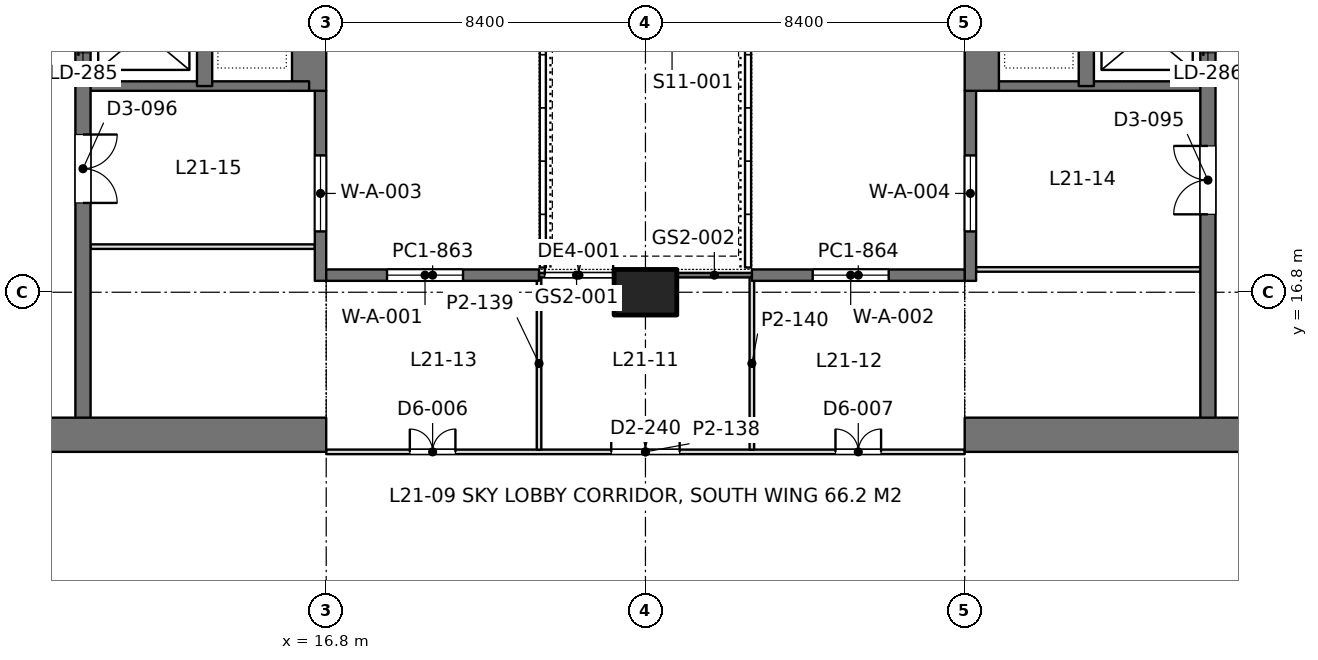
"""IFC4 building model, lengths in metres.
Left out: names, types, materials, properties, quantities, classifications, styles, units other than length and angle.
Written with IfcOpenShell. Run it as: python <this file> out.ifc"""

import sys

from ifc_helpers import new_model, si_unit, direction, frame, frame_2d, origin, origin_2d, place, context, subcontext, project, spatial, rectangle, extrude, element, fill, save


model = new_model("IFC4")
c1 = context("Model", 3, precision=1e-05, world=origin(), true_north=direction((0.0, 1.0)))
c2 = subcontext(c1, "Body", "Model", "MODEL_VIEW")
j1 = project(units=[si_unit("LENGTHUNIT", "METRE"), si_unit("PLANEANGLEUNIT", "RADIAN")], contexts=[c1])
p1 = place(None, origin())
s1 = spatial("IfcSite", under=j1, at=p1, CompositionType="ELEMENT")
p2 = place(p1, origin())
s2 = spatial("IfcBuilding", under=s1, at=p2, CompositionType="ELEMENT")
p3 = place(p2, frame((0.0, 0.0, 96.3)))
s3 = spatial("IfcBuildingStorey", under=s2, at=p3, CompositionType="ELEMENT", Elevation=96.3)
p4 = place(p3, frame((25.2, 16.8, 0.0), z_axis=(0.0, 0.0, 1.0), x_axis=(1.0, 0.0, 0.0)))
e1 = element("IfcColumn", 1, at=p4, inside=s3, PredefinedType="COLUMN", context=c2, shape_type="SweptSolid", body=[
    extrude(rectangle(XDim=1.65, YDim=1.2, at=origin_2d()), origin(), (0.0, 0.0, 1.0), 4.5),
])
p5 = place(p3, frame((-1.2, 13.05, 0.0), z_axis=(0.0, 0.0, 1.0), x_axis=(1.0, 0.0, 0.0)))
e2 = element("IfcWall", 2, at=p5, inside=s3, PredefinedType="SHEAR", context=c2, shape_type="SweptSolid", body=[
    extrude(rectangle(XDim=18.0, YDim=0.9, at=frame_2d((9.0, 0.0))), origin(), (0.0, 0.0, 1.0), 4.5),
])
p6 = place(p5, frame((8.95, 0.0, 0.0)))
e3 = element("IfcOpeningElement", 3, at=p6, cuts=e2, PredefinedType="OPENING", context=c2, shape_type="SweptSolid", body=[
    extrude(rectangle(XDim=1.8, YDim=2.4, at=frame_2d((0.9, 1.2))), frame((0.0, 0.46, 0.0), z_axis=(0.0, -1.0, 0.0), x_axis=(1.0, 0.0, 0.0)), (0.0, 0.0, 1.0), 0.92),
])
p7 = place(p3, frame((16.35, 22.1, 0.0), z_axis=(0.0, 0.0, 1.0), x_axis=(0.0, 1.0, 0.0)))
e4 = element("IfcWall", 4, at=p7, inside=s3, PredefinedType="SHEAR", context=c2, shape_type="SweptSolid", body=[
    extrude(rectangle(XDim=15.25, YDim=0.9, at=frame_2d((7.625, 0.0))), origin(), (0.0, 0.0, 1.0), 4.5),
])
p8 = place(p3, frame((10.4, 13.05, 0.0), z_axis=(0.0, 0.0, 1.0), x_axis=(0.0, 1.0, 0.0)))
e5 = element("IfcWall", 5, at=p8, inside=s3, PredefinedType="SHEAR", context=c2, shape_type="SweptSolid", body=[
    extrude(rectangle(XDim=24.3, YDim=0.4, at=frame_2d((12.15, 0.0))), origin(), (0.0, 0.0, 1.0), 4.5),
])
p9 = place(p8, frame((10.05, 0.0, 0.0)))
e6 = element("IfcOpeningElement", 6, at=p9, cuts=e5, PredefinedType="OPENING", context=c2, shape_type="SweptSolid", body=[
    extrude(rectangle(XDim=1.1, YDim=2.2, at=frame_2d((0.55, 1.1))), frame((0.0, 0.21, 0.0), z_axis=(0.0, -1.0, 0.0), x_axis=(1.0, 0.0, 0.0)), (0.0, 0.0, 1.0), 0.42),
])
p10 = place(p8, frame((12.9, 0.0, 0.0)))
e7 = element("IfcOpeningElement", 7, at=p10, cuts=e5, PredefinedType="OPENING", context=c2, shape_type="SweptSolid", body=[
    extrude(rectangle(XDim=1.1, YDim=2.2, at=frame_2d((0.55, 1.1))), frame((0.0, 0.21, 0.0), z_axis=(0.0, -1.0, 0.0), x_axis=(1.0, 0.0, 0.0)), (0.0, 0.0, 1.0), 0.42),
])
p11 = place(p8, frame((21.45, 0.0, 0.0)))
e8 = element("IfcOpeningElement", 8, at=p11, cuts=e5, PredefinedType="OPENING", context=c2, shape_type="SweptSolid", body=[
    extrude(rectangle(XDim=1.1, YDim=2.2, at=frame_2d((0.55, 1.1))), frame((0.0, 0.21, 0.0), z_axis=(0.0, -1.0, 0.0), x_axis=(1.0, 0.0, 0.0)), (0.0, 0.0, 1.0), 0.42),
])
p12 = place(p8, frame((6.1, 0.0, 0.0)))
e9 = element("IfcOpeningElement", 9, at=p12, cuts=e5, PredefinedType="OPENING", context=c2, shape_type="SweptSolid", body=[
    extrude(rectangle(XDim=1.8, YDim=2.4, at=frame_2d((0.9, 1.2))), frame((0.0, 0.21, 0.0), z_axis=(0.0, -1.0, 0.0), x_axis=(1.0, 0.0, 0.0)), (0.0, 0.0, 1.0), 0.42),
])
p13 = place(p3, frame((13.6, 22.225, 0.0), z_axis=(0.0, 0.0, 1.0), x_axis=(0.0, 1.0, 0.0)))
e10 = element("IfcWall", 10, at=p13, inside=s3, PredefinedType="SHEAR", context=c2, shape_type="SweptSolid", body=[
    extrude(rectangle(XDim=15.125, YDim=0.4, at=frame_2d((7.562, 0.0))), origin(), (0.0, 0.0, 1.0), 4.5),
])
p14 = place(p3, frame((10.4, 22.225, 0.0), z_axis=(0.0, 0.0, 1.0), x_axis=(1.0, 0.0, 0.0)))
e11 = element("IfcWall", 11, at=p14, inside=s3, PredefinedType="SHEAR", context=c2, shape_type="SweptSolid", body=[
    extrude(rectangle(XDim=5.95, YDim=0.25, at=frame_2d((2.975, 0.0))), origin(), (0.0, 0.0, 1.0), 4.5),
])
p15 = place(p3, frame((33.6, 13.05, 0.0), z_axis=(0.0, 0.0, 1.0), x_axis=(1.0, 0.0, 0.0)))
e12 = element("IfcWall", 12, at=p15, inside=s3, PredefinedType="SHEAR", context=c2, shape_type="SweptSolid", body=[
    extrude(rectangle(XDim=18.0, YDim=0.9, at=frame_2d((9.0, 0.0))), origin(), (0.0, 0.0, 1.0), 4.5),
])
p16 = place(p15, frame((7.25, 0.0, 0.0)))
e13 = element("IfcOpeningElement", 13, at=p16, cuts=e12, PredefinedType="OPENING", context=c2, shape_type="SweptSolid", body=[
    extrude(rectangle(XDim=1.8, YDim=2.4, at=frame_2d((0.9, 1.2))), frame((0.0, 0.46, 0.0), z_axis=(0.0, -1.0, 0.0), x_axis=(1.0, 0.0, 0.0)), (0.0, 0.0, 1.0), 0.92),
])
p17 = place(p3, frame((34.05, 22.1, 0.0), z_axis=(0.0, 0.0, 1.0), x_axis=(0.0, 1.0, 0.0)))
e14 = element("IfcWall", 14, at=p17, inside=s3, PredefinedType="SHEAR", context=c2, shape_type="SweptSolid", body=[
    extrude(rectangle(XDim=15.25, YDim=0.9, at=frame_2d((7.625, 0.0))), origin(), (0.0, 0.0, 1.0), 4.5),
])
p18 = place(p3, frame((40.0, 13.05, 0.0), z_axis=(0.0, 0.0, 1.0), x_axis=(0.0, 1.0, 0.0)))
e15 = element("IfcWall", 15, at=p18, inside=s3, PredefinedType="SHEAR", context=c2, shape_type="SweptSolid", body=[
    extrude(rectangle(XDim=24.3, YDim=0.4, at=frame_2d((12.15, 0.0))), origin(), (0.0, 0.0, 1.0), 4.5),
])
p19 = place(p18, frame((10.05, 0.0, 0.0)))
e16 = element("IfcOpeningElement", 16, at=p19, cuts=e15, PredefinedType="OPENING", context=c2, shape_type="SweptSolid", body=[
    extrude(rectangle(XDim=1.1, YDim=2.2, at=frame_2d((0.55, 1.1))), frame((0.0, 0.21, 0.0), z_axis=(0.0, -1.0, 0.0), x_axis=(1.0, 0.0, 0.0)), (0.0, 0.0, 1.0), 0.42),
])
p20 = place(p18, frame((12.9, 0.0, 0.0)))
e17 = element("IfcOpeningElement", 17, at=p20, cuts=e15, PredefinedType="OPENING", context=c2, shape_type="SweptSolid", body=[
    extrude(rectangle(XDim=1.1, YDim=2.2, at=frame_2d((0.55, 1.1))), frame((0.0, 0.21, 0.0), z_axis=(0.0, -1.0, 0.0), x_axis=(1.0, 0.0, 0.0)), (0.0, 0.0, 1.0), 0.42),
])
p21 = place(p18, frame((21.45, 0.0, 0.0)))
e18 = element("IfcOpeningElement", 18, at=p21, cuts=e15, PredefinedType="OPENING", context=c2, shape_type="SweptSolid", body=[
    extrude(rectangle(XDim=1.1, YDim=2.2, at=frame_2d((0.55, 1.1))), frame((0.0, 0.21, 0.0), z_axis=(0.0, -1.0, 0.0), x_axis=(1.0, 0.0, 0.0)), (0.0, 0.0, 1.0), 0.42),
])
p22 = place(p18, frame((5.8, 0.0, 0.0)))
e19 = element("IfcOpeningElement", 19, at=p22, cuts=e15, PredefinedType="OPENING", context=c2, shape_type="SweptSolid", body=[
    extrude(rectangle(XDim=1.8, YDim=2.4, at=frame_2d((0.9, 1.2))), frame((0.0, 0.21, 0.0), z_axis=(0.0, -1.0, 0.0), x_axis=(1.0, 0.0, 0.0)), (0.0, 0.0, 1.0), 0.42),
])
p23 = place(p3, frame((36.8, 22.225, 0.0), z_axis=(0.0, 0.0, 1.0), x_axis=(0.0, 1.0, 0.0)))
e20 = element("IfcWall", 20, at=p23, inside=s3, PredefinedType="SHEAR", context=c2, shape_type="SweptSolid", body=[
    extrude(rectangle(XDim=15.125, YDim=0.4, at=frame_2d((7.562, 0.0))), origin(), (0.0, 0.0, 1.0), 4.5),
])
p24 = place(p3, frame((40.0, 22.225, 0.0), z_axis=(0.0, 0.0, 1.0), x_axis=(-1.0, 0.0, 0.0)))
e21 = element("IfcWall", 21, at=p24, inside=s3, PredefinedType="SHEAR", context=c2, shape_type="SweptSolid", body=[
    extrude(rectangle(XDim=5.95, YDim=0.25, at=frame_2d((2.975, 0.0))), origin(), (0.0, 0.0, 1.0), 4.5),
])
p25 = place(p3, frame((16.65, 17.1, 0.0), z_axis=(0.0, 0.0, 1.0), x_axis=(0.0, 1.0, 0.0)))
e22 = element("IfcWall", 22, at=p25, inside=s3, PredefinedType="SOLIDWALL", context=c2, shape_type="SweptSolid", body=[
    extrude(rectangle(XDim=5.0, YDim=0.3, at=frame_2d((2.5, 0.0))), origin(), (0.0, 0.0, 1.0), 4.35),
])
p26 = place(p25, frame((1.3, 0.0, 0.1)))
e23 = element("IfcOpeningElement", 23, at=p26, cuts=e22, PredefinedType="OPENING", context=c2, shape_type="SweptSolid", body=[
    extrude(rectangle(XDim=2.0, YDim=3.0, at=frame_2d((1.0, 1.5))), frame((0.0, 0.16, 0.0), z_axis=(0.0, -1.0, 0.0), x_axis=(1.0, 0.0, 0.0)), (0.0, 0.0, 1.0), 0.32),
])
p27 = place(p3, frame((33.75, 17.1, 0.0), z_axis=(0.0, 0.0, 1.0), x_axis=(0.0, 1.0, 0.0)))
e24 = element("IfcWall", 24, at=p27, inside=s3, PredefinedType="SOLIDWALL", context=c2, shape_type="SweptSolid", body=[
    extrude(rectangle(XDim=5.0, YDim=0.3, at=frame_2d((2.5, 0.0))), origin(), (0.0, 0.0, 1.0), 4.35),
])
p28 = place(p27, frame((1.3, 0.0, 0.1)))
e25 = element("IfcOpeningElement", 25, at=p28, cuts=e24, PredefinedType="OPENING", context=c2, shape_type="SweptSolid", body=[
    extrude(rectangle(XDim=2.0, YDim=3.0, at=frame_2d((1.0, 1.5))), frame((0.0, 0.16, 0.0), z_axis=(0.0, -1.0, 0.0), x_axis=(1.0, 0.0, 0.0)), (0.0, 0.0, 1.0), 0.32),
])
p29 = place(p3, frame((16.8, 17.25, 0.0), z_axis=(0.0, 0.0, 1.0), x_axis=(1.0, 0.0, 0.0)))
e26 = element("IfcWall", 26, at=p29, inside=s3, PredefinedType="SOLIDWALL", context=c2, shape_type="SweptSolid", body=[
    extrude(rectangle(XDim=5.6, YDim=0.3, at=frame_2d((2.8, 0.0))), origin(), (0.0, 0.0, 1.0), 4.35),
])
p30 = place(p29, frame((1.6, 0.0, 0.1)))
e27 = element("IfcOpeningElement", 27, at=p30, cuts=e26, PredefinedType="OPENING", context=c2, shape_type="SweptSolid", body=[
    extrude(rectangle(XDim=2.0, YDim=3.0, at=frame_2d((1.0, 1.5))), frame((0.0, 0.16, 0.0), z_axis=(0.0, -1.0, 0.0), x_axis=(1.0, 0.0, 0.0)), (0.0, 0.0, 1.0), 0.32),
])
p31 = place(p3, frame((22.4, 17.25, 0.0), z_axis=(0.0, 0.0, 1.0), x_axis=(1.0, 0.0, 0.0)))
e28 = element("IfcWall", 28, at=p31, inside=s3, PredefinedType="SOLIDWALL", context=c2, shape_type="SweptSolid", body=[
    extrude(rectangle(XDim=1.975, YDim=0.12, at=frame_2d((0.988, 0.0))), origin(), (0.0, 0.0, 1.0), 4.35),
])
p32 = place(p31, frame((0.15, 0.0, 0.0)))
e29 = element("IfcOpeningElement", 29, at=p32, cuts=e28, PredefinedType="OPENING", context=c2, shape_type="SweptSolid", body=[
    extrude(rectangle(XDim=1.8, YDim=2.4, at=frame_2d((0.9, 1.2))), frame((0.0, 0.07, 0.0), z_axis=(0.0, -1.0, 0.0), x_axis=(1.0, 0.0, 0.0)), (0.0, 0.0, 1.0), 0.14),
])
p33 = place(p3, frame((26.025, 17.25, 0.0), z_axis=(0.0, 0.0, 1.0), x_axis=(1.0, 0.0, 0.0)))
e30 = element("IfcWall", 30, at=p33, inside=s3, PredefinedType="SOLIDWALL", context=c2, shape_type="SweptSolid", body=[
    extrude(rectangle(XDim=1.975, YDim=0.12, at=frame_2d((0.988, 0.0))), origin(), (0.0, 0.0, 1.0), 4.35),
])
p34 = place(p3, frame((28.0, 17.25, 0.0), z_axis=(0.0, 0.0, 1.0), x_axis=(1.0, 0.0, 0.0)))
e31 = element("IfcWall", 31, at=p34, inside=s3, PredefinedType="SOLIDWALL", context=c2, shape_type="SweptSolid", body=[
    extrude(rectangle(XDim=5.6, YDim=0.3, at=frame_2d((2.8, 0.0))), origin(), (0.0, 0.0, 1.0), 4.35),
])
p35 = place(p34, frame((1.6, 0.0, 0.1)))
e32 = element("IfcOpeningElement", 32, at=p35, cuts=e31, PredefinedType="OPENING", context=c2, shape_type="SweptSolid", body=[
    extrude(rectangle(XDim=2.0, YDim=3.0, at=frame_2d((1.0, 1.5))), frame((0.0, 0.16, 0.0), z_axis=(0.0, -1.0, 0.0), x_axis=(1.0, 0.0, 0.0)), (0.0, 0.0, 1.0), 0.32),
])
for number, where, z_axis, x_axis in (
    (33, (10.598, 18.0, 0.0), (0.0, 0.0, 1.0), (1.0, 0.0, 0.0)),
    (34, (33.898, 17.4, 0.0), (0.0, 0.0, 1.0), (1.0, 0.0, 0.0)),
):
    element("IfcWall", number, at=place(p3, frame(where, z_axis=z_axis, x_axis=x_axis)), inside=s3, PredefinedType="PARTITIONING", context=c2, shape_type="SweptSolid", body=[
        extrude(rectangle(XDim=5.904, YDim=0.12, at=frame_2d((2.952, 0.0))), origin(), (0.0, 0.0, 1.0), 3.85),
    ])
p36 = place(p3, frame((16.8, 12.6, 0.0), z_axis=(0.0, 0.0, 1.0), x_axis=(1.0, 0.0, 0.0)))
e35 = element("IfcWall", 35, at=p36, inside=s3, PredefinedType="PARTITIONING", context=c2, shape_type="SweptSolid", body=[
    extrude(rectangle(XDim=16.8, YDim=0.12, at=frame_2d((8.4, 0.0))), origin(), (0.0, 0.0, 1.0), 3.85),
])
p37 = place(p36, frame((2.2, 0.0, 0.0)))
e36 = element("IfcOpeningElement", 36, at=p37, cuts=e35, PredefinedType="OPENING", context=c2, shape_type="SweptSolid", body=[
    extrude(rectangle(XDim=1.2, YDim=2.2, at=frame_2d((0.6, 1.1))), frame((0.0, 0.07, 0.0), z_axis=(0.0, -1.0, 0.0), x_axis=(1.0, 0.0, 0.0)), (0.0, 0.0, 1.0), 0.14),
])
p38 = place(p36, frame((7.5, 0.0, 0.0)))
e37 = element("IfcOpeningElement", 37, at=p38, cuts=e35, PredefinedType="OPENING", context=c2, shape_type="SweptSolid", body=[
    extrude(rectangle(XDim=1.8, YDim=2.2, at=frame_2d((0.9, 1.1))), frame((0.0, 0.07, 0.0), z_axis=(0.0, -1.0, 0.0), x_axis=(1.0, 0.0, 0.0)), (0.0, 0.0, 1.0), 0.14),
])
p39 = place(p36, frame((13.4, 0.0, 0.0)))
e38 = element("IfcOpeningElement", 38, at=p39, cuts=e35, PredefinedType="OPENING", context=c2, shape_type="SweptSolid", body=[
    extrude(rectangle(XDim=1.2, YDim=2.2, at=frame_2d((0.6, 1.1))), frame((0.0, 0.07, 0.0), z_axis=(0.0, -1.0, 0.0), x_axis=(1.0, 0.0, 0.0)), (0.0, 0.0, 1.0), 0.14),
])
for number, where, z_axis, x_axis in (
    (39, (22.4, 12.658, 0.0), (0.0, 0.0, 1.0), (0.0, 1.0, 0.0)),
    (40, (28.0, 12.658, 0.0), (0.0, 0.0, 1.0), (0.0, 1.0, 0.0)),
):
    element("IfcWall", number, at=place(p3, frame(where, z_axis=z_axis, x_axis=x_axis)), inside=s3, PredefinedType="PARTITIONING", context=c2, shape_type="SweptSolid", body=[
        extrude(rectangle(XDim=4.534, YDim=0.12, at=frame_2d((2.267, 0.0))), origin(), (0.0, 0.0, 1.0), 3.5),
    ])
p40 = place(p26, origin())
e41 = element("IfcWindow", 41, at=p40, inside=s3, PartitioningType="SINGLE_PANEL", PredefinedType="WINDOW", context=c2, shape_type="SweptSolid", body=[
    extrude(rectangle(XDim=2.0, YDim=3.0, at=frame_2d((1.0, 1.5))), frame((0.0, 0.03, 0.0), z_axis=(0.0, -1.0, 0.0), x_axis=(1.0, 0.0, 0.0)), (0.0, 0.0, 1.0), 0.06),
])
fill(e23, e41)
p41 = place(p28, origin())
e42 = element("IfcWindow", 42, at=p41, inside=s3, PartitioningType="SINGLE_PANEL", PredefinedType="WINDOW", context=c2, shape_type="SweptSolid", body=[
    extrude(rectangle(XDim=2.0, YDim=3.0, at=frame_2d((1.0, 1.5))), frame((0.0, 0.03, 0.0), z_axis=(0.0, -1.0, 0.0), x_axis=(1.0, 0.0, 0.0)), (0.0, 0.0, 1.0), 0.06),
])
fill(e25, e42)
p42 = place(p30, origin())
e43 = element("IfcWindow", 43, at=p42, inside=s3, PartitioningType="SINGLE_PANEL", PredefinedType="WINDOW", context=c2, shape_type="SweptSolid", body=[
    extrude(rectangle(XDim=2.0, YDim=3.0, at=frame_2d((1.0, 1.5))), frame((0.0, 0.03, 0.0), z_axis=(0.0, -1.0, 0.0), x_axis=(1.0, 0.0, 0.0)), (0.0, 0.0, 1.0), 0.06),
])
fill(e27, e43)
p43 = place(p32, origin())
e44 = element("IfcDoor", 44, at=p43, inside=s3, OperationType="DOUBLE_DOOR_SINGLE_SWING", PredefinedType="DOOR", context=c2, shape_type="SweptSolid", body=[
    extrude(rectangle(XDim=1.8, YDim=2.4, at=frame_2d((0.9, 1.2))), frame((0.0, 0.025, 0.0), z_axis=(0.0, -1.0, 0.0), x_axis=(1.0, 0.0, 0.0)), (0.0, 0.0, 1.0), 0.05),
])
fill(e29, e44)
p44 = place(p35, origin())
e45 = element("IfcWindow", 45, at=p44, inside=s3, PartitioningType="SINGLE_PANEL", PredefinedType="WINDOW", context=c2, shape_type="SweptSolid", body=[
    extrude(rectangle(XDim=2.0, YDim=3.0, at=frame_2d((1.0, 1.5))), frame((0.0, 0.03, 0.0), z_axis=(0.0, -1.0, 0.0), x_axis=(1.0, 0.0, 0.0)), (0.0, 0.0, 1.0), 0.06),
])
fill(e32, e45)
p45 = place(p12, frame((1.8, 0.0, 0.0), z_axis=(0.0, 0.0, 1.0), x_axis=(-1.0, 0.0, 0.0)))
e46 = element("IfcDoor", 46, at=p45, inside=s3, OperationType="DOUBLE_DOOR_SINGLE_SWING", PredefinedType="DOOR", context=c2, shape_type="SweptSolid", body=[
    extrude(rectangle(XDim=1.8, YDim=2.4, at=frame_2d((0.9, 1.2))), frame((0.0, 0.025, 0.0), z_axis=(0.0, -1.0, 0.0), x_axis=(1.0, 0.0, 0.0)), (0.0, 0.0, 1.0), 0.05),
])
fill(e9, e46)
p46 = place(p22, origin())
e47 = element("IfcDoor", 47, at=p46, inside=s3, OperationType="DOUBLE_DOOR_SINGLE_SWING", PredefinedType="DOOR", context=c2, shape_type="SweptSolid", body=[
    extrude(rectangle(XDim=1.8, YDim=2.4, at=frame_2d((0.9, 1.2))), frame((0.0, 0.025, 0.0), z_axis=(0.0, -1.0, 0.0), x_axis=(1.0, 0.0, 0.0)), (0.0, 0.0, 1.0), 0.05),
])
fill(e19, e47)
p47 = place(p37, origin())
e48 = element("IfcDoor", 48, at=p47, inside=s3, OperationType="DOUBLE_DOOR_SINGLE_SWING_OPPOSITE_LEFT", PredefinedType="DOOR", context=c2, shape_type="SweptSolid", body=[
    extrude(rectangle(XDim=1.2, YDim=2.2, at=frame_2d((0.6, 1.1))), frame((0.0, 0.025, 0.0), z_axis=(0.0, -1.0, 0.0), x_axis=(1.0, 0.0, 0.0)), (0.0, 0.0, 1.0), 0.05),
])
fill(e36, e48)
p48 = place(p38, origin())
e49 = element("IfcDoor", 49, at=p48, inside=s3, OperationType="DOUBLE_DOOR_SINGLE_SWING", PredefinedType="DOOR", context=c2, shape_type="SweptSolid", body=[
    extrude(rectangle(XDim=1.8, YDim=2.2, at=frame_2d((0.9, 1.1))), frame((0.0, 0.025, 0.0), z_axis=(0.0, -1.0, 0.0), x_axis=(1.0, 0.0, 0.0)), (0.0, 0.0, 1.0), 0.05),
])
fill(e37, e49)
p49 = place(p39, origin())
e50 = element("IfcDoor", 50, at=p49, inside=s3, OperationType="DOUBLE_DOOR_SINGLE_SWING_OPPOSITE_LEFT", PredefinedType="DOOR", context=c2, shape_type="SweptSolid", body=[
    extrude(rectangle(XDim=1.2, YDim=2.2, at=frame_2d((0.6, 1.1))), frame((0.0, 0.025, 0.0), z_axis=(0.0, -1.0, 0.0), x_axis=(1.0, 0.0, 0.0)), (0.0, 0.0, 1.0), 0.05),
])
fill(e38, e50)
save(model, sys.argv[1])
